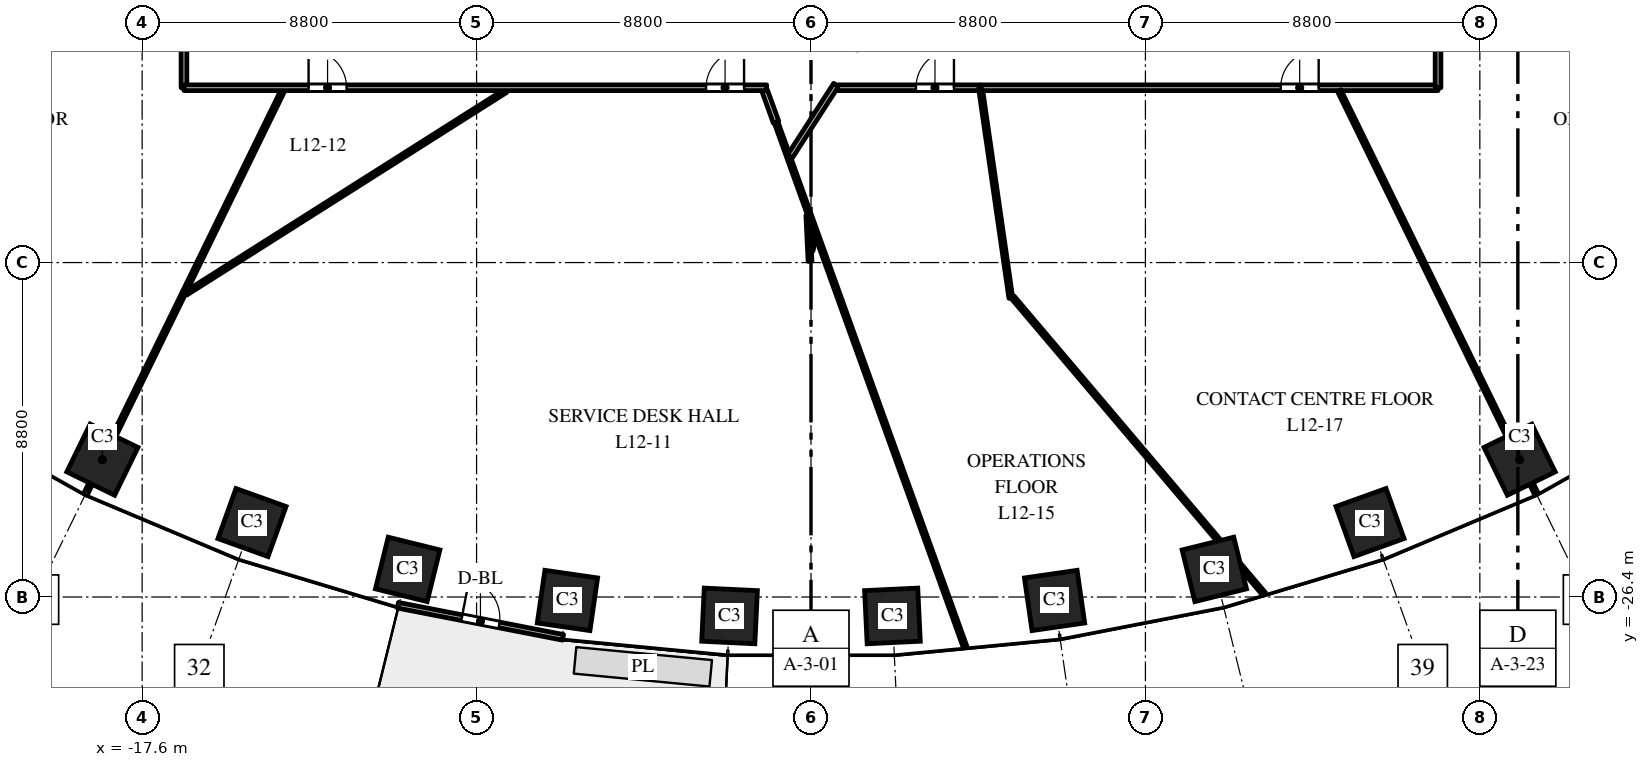
"""IFC4 building model, lengths in metres.
Left out: names, types, materials, properties, quantities, classifications, styles, units other than length and angle.
Written with IfcOpenShell. Run it as: python <this file> out.ifc"""

import sys

from ifc_helpers import new_model, si_unit, direction, frame, frame_2d, origin, origin_2d, place, context, subcontext, project, spatial, rectangle, extrude, element, fill, save


model = new_model("IFC4")
c1 = context("Model", 3, precision=1e-05, world=origin(), true_north=direction((0.0, 1.0)))
c2 = subcontext(c1, "Body", "Model", "MODEL_VIEW")
j1 = project(units=[si_unit("LENGTHUNIT", "METRE"), si_unit("PLANEANGLEUNIT", "RADIAN")], contexts=[c1])
p1 = place(None, origin())
s1 = spatial("IfcSite", under=j1, at=p1, CompositionType="ELEMENT")
p2 = place(p1, origin())
s2 = spatial("IfcBuilding", under=s1, at=p2, CompositionType="ELEMENT")
p3 = place(p2, frame((0.0, 0.0, 58.5)))
s3 = spatial("IfcBuildingStorey", under=s2, at=p3, CompositionType="ELEMENT", Elevation=58.5)
for number, where, z_axis, x_axis in (
    (1, (-18.646, -22.785, 0.0), (0.0, 0.0, 1.0), (0.898, -0.439, 0.0)),
    (2, (-14.709, -24.441, 0.0), (0.0, 0.0, 1.0), (0.941, -0.338, 0.0)),
    (3, (-10.613, -25.674, 0.0), (0.0, 0.0, 1.0), (0.971, -0.24, 0.0)),
    (4, (-6.409, -26.491, 0.0), (0.0, 0.0, 1.0), (0.99, -0.143, 0.0)),
    (5, (-2.143, -26.898, 0.0), (0.0, 0.0, 1.0), (0.999, -0.048, 0.0)),
    (6, (2.143, -26.898, 0.0), (0.0, 0.0, 1.0), (0.999, 0.048, 0.0)),
    (7, (6.409, -26.491, 0.0), (0.0, 0.0, 1.0), (0.99, 0.143, 0.0)),
    (8, (10.613, -25.674, 0.0), (0.0, 0.0, 1.0), (0.971, 0.24, 0.0)),
    (9, (14.709, -24.441, 0.0), (0.0, 0.0, 1.0), (0.941, 0.338, 0.0)),
    (10, (18.646, -22.785, 0.0), (0.0, 0.0, 1.0), (0.898, 0.439, 0.0)),
):
    element("IfcColumn", number, at=place(p3, frame(where, z_axis=z_axis, x_axis=x_axis)), inside=s3, PredefinedType="COLUMN", context=c2, shape_type="SweptSolid", body=[
        extrude(rectangle(XDim=1.4, YDim=1.4, at=origin_2d()), origin(), (0.0, 0.0, 1.0), 4.0),
    ])
p4 = place(p3, frame((-10.871, -26.617, 0.0), z_axis=(0.0, 0.0, 1.0), x_axis=(0.981631174778, -0.190788460615, 0.0)))
e11 = element("IfcWall", 11, at=p4, inside=s3, PredefinedType="STANDARD", context=c2, shape_type="SweptSolid", body=[
    extrude(rectangle(XDim=4.426, YDim=0.15, at=frame_2d((2.213, 0.0))), origin(), (0.0, 0.0, 1.0), 3.7),
])
p5 = place(p4, frame((1.713, 0.0, 0.0)))
e12 = element("IfcOpeningElement", 12, at=p5, cuts=e11, PredefinedType="OPENING", context=c2, shape_type="SweptSolid", body=[
    extrude(rectangle(XDim=1.0, YDim=2.4, at=frame_2d((0.5, 1.2))), frame((0.0, 0.085, 0.0), z_axis=(0.0, -1.0, 0.0), x_axis=(1.0, 0.0, 0.0)), (0.0, 0.0, 1.0), 0.17),
])
p6 = place(p3, frame((-19.086, -23.685, 0.0), z_axis=(0.0, 0.0, 1.0), x_axis=(0.439199750603, 0.898389436197, 0.0)))
e13 = element("IfcWall", 13, at=p6, inside=s3, PredefinedType="PARTITIONING", context=c2, shape_type="SweptSolid", body=[
    extrude(rectangle(XDim=11.81, YDim=0.1, at=frame_2d((5.905, 0.0))), origin(), (0.0, 0.0, 1.0), 3.7),
])
p7 = place(p3, frame((-16.452, -18.412, 0.0), z_axis=(0.0, 0.0, 1.0), x_axis=(0.84481391066, 0.535060236194, 0.0)))
e14 = element("IfcWall", 14, at=p7, inside=s3, PredefinedType="PARTITIONING", context=c2, shape_type="SweptSolid", body=[
    extrude(rectangle(XDim=9.971, YDim=0.1, at=frame_2d((4.986, 0.0))), origin(), (0.0, 0.0, 1.0), 2.85),
])
p8 = place(p3, frame((-16.5, -13.0, 0.0), z_axis=(0.0, 0.0, 1.0), x_axis=(0.0, 1.0, 0.0)))
e15 = element("IfcWall", 15, at=p8, inside=s3, PredefinedType="PARTITIONING", context=c2, shape_type="SweptSolid", body=[
    extrude(rectangle(XDim=2.3, YDim=0.15, at=frame_2d((1.15, 0.0))), origin(), (0.0, 0.0, 1.0), 2.75),
])
p9 = place(p3, frame((-16.5, -13.0, 0.0), z_axis=(0.0, 0.0, 1.0), x_axis=(1.0, 0.0, 0.0)))
e16 = element("IfcWall", 16, at=p9, inside=s3, PredefinedType="PARTITIONING", context=c2, shape_type="SweptSolid", body=[
    extrude(rectangle(XDim=15.334, YDim=0.15, at=frame_2d((7.667, 0.0))), origin(), (0.0, 0.0, 1.0), 2.85),
])
p10 = place(p9, frame((13.739, 0.0, 0.0)))
e17 = element("IfcOpeningElement", 17, at=p10, cuts=e16, PredefinedType="OPENING", context=c2, shape_type="SweptSolid", body=[
    extrude(rectangle(XDim=1.0, YDim=2.1, at=frame_2d((0.5, 1.05))), frame((0.0, 0.085, 0.0), z_axis=(0.0, -1.0, 0.0), x_axis=(1.0, 0.0, 0.0)), (0.0, 0.0, 1.0), 0.17),
])
p11 = place(p9, frame((3.279, 0.0, 0.0)))
e18 = element("IfcOpeningElement", 18, at=p11, cuts=e16, PredefinedType="OPENING", context=c2, shape_type="SweptSolid", body=[
    extrude(rectangle(XDim=1.0, YDim=2.1, at=frame_2d((0.5, 1.05))), frame((0.0, 0.085, 0.0), z_axis=(0.0, -1.0, 0.0), x_axis=(1.0, 0.0, 0.0)), (0.0, 0.0, 1.0), 0.17),
])
p12 = place(p3, frame((-1.218, -13.079, 0.0), z_axis=(0.0, 0.0, 1.0), x_axis=(0.339052677967, -0.940767389722, 0.0)))
e19 = element("IfcWall", 19, at=p12, inside=s3, PredefinedType="PARTITIONING", context=c2, shape_type="SweptSolid", body=[
    extrude(rectangle(XDim=0.882, YDim=0.15, at=frame_2d((0.441, 0.0))), origin(), (0.0, 0.0, 1.0), 2.85),
])
p13 = place(p3, frame((-0.916, -13.918, 0.0), z_axis=(0.0, 0.0, 1.0), x_axis=(0.338981210053, -0.940793143699, 0.0)))
e20 = element("IfcWall", 20, at=p13, inside=s3, PredefinedType="PARTITIONING", context=c2, shape_type="SweptSolid", body=[
    extrude(rectangle(XDim=14.664, YDim=0.1, at=frame_2d((7.332, 0.0))), origin(), (0.0, 0.0, 1.0), 2.85),
])
p14 = place(p3, frame((-0.084, -16.356, 0.0), z_axis=(0.0, 0.0, 1.0), x_axis=(0.047967320325, -0.998848905581, 0.0)))
e21 = element("IfcWall", 21, at=p14, inside=s3, PredefinedType="PARTITIONING", context=c2, shape_type="SweptSolid", body=[
    extrude(rectangle(XDim=1.211, YDim=0.1, at=frame_2d((0.606, 0.0))), origin(), (0.0, 0.0, 1.0), 3.7),
])
p15 = place(p3, frame((-0.554, -14.806, 0.0), z_axis=(0.0, 0.0, 1.0), x_axis=(0.542256038928, 0.840213299256, 0.0)))
e22 = element("IfcWall", 22, at=p15, inside=s3, PredefinedType="PARTITIONING", context=c2, shape_type="SweptSolid", body=[
    extrude(rectangle(XDim=2.239, YDim=0.15, at=frame_2d((1.119, 0.0))), origin(), (0.0, 0.0, 1.0), 3.7),
])
p16 = place(p3, frame((0.002, -17.284, 0.0), z_axis=(0.0, 0.0, 1.0), x_axis=(0.240121592304, 0.970742819139, 0.0)))
e23 = element("IfcWall", 23, at=p16, inside=s3, PredefinedType="PARTITIONING", context=c2, shape_type="SweptSolid", body=[
    extrude(rectangle(XDim=0.405, YDim=0.1, at=frame_2d((0.202, 0.0))), origin(), (0.0, 0.0, 1.0), 3.7),
])
p17 = place(p3, frame((0.701, -13.0, 0.0), z_axis=(0.0, 0.0, 1.0), x_axis=(1.0, 0.0, 0.0)))
e24 = element("IfcWall", 24, at=p17, inside=s3, PredefinedType="PARTITIONING", context=c2, shape_type="SweptSolid", body=[
    extrude(rectangle(XDim=3.758, YDim=0.15, at=frame_2d((1.879, 0.0))), origin(), (0.0, 0.0, 1.0), 2.85),
])
p18 = place(p17, frame((2.061, 0.0, 0.0)))
e25 = element("IfcOpeningElement", 25, at=p18, cuts=e24, PredefinedType="OPENING", context=c2, shape_type="SweptSolid", body=[
    extrude(rectangle(XDim=1.0, YDim=2.1, at=frame_2d((0.5, 1.05))), frame((0.0, 0.085, 0.0), z_axis=(0.0, -1.0, 0.0), x_axis=(1.0, 0.0, 0.0)), (0.0, 0.0, 1.0), 0.17),
])
p19 = place(p3, frame((4.459, -13.004, 0.0), z_axis=(0.0, 0.0, 1.0), x_axis=(0.143036391033, -0.989717429795, 0.0)))
e26 = element("IfcWall", 26, at=p19, inside=s3, PredefinedType="PARTITIONING", context=c2, shape_type="SweptSolid", body=[
    extrude(rectangle(XDim=5.586, YDim=0.1, at=frame_2d((2.793, 0.0))), origin(), (0.0, 0.0, 1.0), 3.7),
])
p20 = place(p3, frame((4.479, -13.0, 0.0), z_axis=(0.0, 0.0, 1.0), x_axis=(1.0, 0.0, 0.0)))
e27 = element("IfcWall", 27, at=p20, inside=s3, PredefinedType="PARTITIONING", context=c2, shape_type="SweptSolid", body=[
    extrude(rectangle(XDim=12.021, YDim=0.15, at=frame_2d((6.01, 0.0))), origin(), (0.0, 0.0, 1.0), 2.85),
])
p21 = place(p20, frame((7.88, 0.0, 0.0)))
e28 = element("IfcOpeningElement", 28, at=p21, cuts=e27, PredefinedType="OPENING", context=c2, shape_type="SweptSolid", body=[
    extrude(rectangle(XDim=1.0, YDim=2.1, at=frame_2d((0.5, 1.05))), frame((0.0, 0.085, 0.0), z_axis=(0.0, -1.0, 0.0), x_axis=(1.0, 0.0, 0.0)), (0.0, 0.0, 1.0), 0.17),
])
p22 = place(p3, frame((5.306, -18.512, 0.0), z_axis=(0.0, 0.0, 1.0), x_axis=(0.646500054355, -0.762913939917, 0.0)))
e29 = element("IfcWall", 29, at=p22, inside=s3, PredefinedType="PARTITIONING", context=c2, shape_type="SweptSolid", body=[
    extrude(rectangle(XDim=10.239, YDim=0.1, at=frame_2d((5.119, 0.0))), origin(), (0.0, 0.0, 1.0), 2.85),
])
p23 = place(p3, frame((13.899, -13.075, 0.0), z_axis=(0.0, 0.0, 1.0), x_axis=(0.439199750603, -0.898389436197, 0.0)))
e30 = element("IfcWall", 30, at=p23, inside=s3, PredefinedType="PARTITIONING", context=c2, shape_type="SweptSolid", body=[
    extrude(rectangle(XDim=11.81, YDim=0.1, at=frame_2d((5.905, 0.0))), origin(), (0.0, 0.0, 1.0), 2.85),
])
p24 = place(p3, frame((16.5, -13.0, 0.0), z_axis=(0.0, 0.0, 1.0), x_axis=(0.0, 1.0, 0.0)))
e31 = element("IfcWall", 31, at=p24, inside=s3, PredefinedType="PARTITIONING", context=c2, shape_type="SweptSolid", body=[
    extrude(rectangle(XDim=2.3, YDim=0.15, at=frame_2d((1.15, 0.0))), origin(), (0.0, 0.0, 1.0), 3.7),
])
p25 = place(p5, origin())
e32 = element("IfcDoor", 32, at=p25, inside=s3, OperationType="SINGLE_SWING_LEFT", PredefinedType="DOOR", context=c2, shape_type="SweptSolid", body=[
    extrude(rectangle(XDim=1.0, YDim=2.4, at=frame_2d((0.5, 1.2))), frame((0.0, 0.025, 0.0), z_axis=(0.0, -1.0, 0.0), x_axis=(1.0, 0.0, 0.0)), (0.0, 0.0, 1.0), 0.05),
])
fill(e12, e32)
p26 = place(p10, origin())
e33 = element("IfcDoor", 33, at=p26, inside=s3, OperationType="SINGLE_SWING_RIGHT", PredefinedType="DOOR", context=c2, shape_type="SweptSolid", body=[
    extrude(rectangle(XDim=1.0, YDim=2.1, at=frame_2d((0.5, 1.05))), frame((0.0, 0.025, 0.0), z_axis=(0.0, -1.0, 0.0), x_axis=(1.0, 0.0, 0.0)), (0.0, 0.0, 1.0), 0.05),
])
fill(e17, e33)
p27 = place(p11, origin())
e34 = element("IfcDoor", 34, at=p27, inside=s3, OperationType="SINGLE_SWING_LEFT", PredefinedType="DOOR", context=c2, shape_type="SweptSolid", body=[
    extrude(rectangle(XDim=1.0, YDim=2.1, at=frame_2d((0.5, 1.05))), frame((0.0, 0.025, 0.0), z_axis=(0.0, -1.0, 0.0), x_axis=(1.0, 0.0, 0.0)), (0.0, 0.0, 1.0), 0.05),
])
fill(e18, e34)
p28 = place(p18, origin())
e35 = element("IfcDoor", 35, at=p28, inside=s3, OperationType="SINGLE_SWING_RIGHT", PredefinedType="DOOR", context=c2, shape_type="SweptSolid", body=[
    extrude(rectangle(XDim=1.0, YDim=2.1, at=frame_2d((0.5, 1.05))), frame((0.0, 0.025, 0.0), z_axis=(0.0, -1.0, 0.0), x_axis=(1.0, 0.0, 0.0)), (0.0, 0.0, 1.0), 0.05),
])
fill(e25, e35)
p29 = place(p21, origin())
e36 = element("IfcDoor", 36, at=p29, inside=s3, OperationType="SINGLE_SWING_RIGHT", PredefinedType="DOOR", context=c2, shape_type="SweptSolid", body=[
    extrude(rectangle(XDim=1.0, YDim=2.1, at=frame_2d((0.5, 1.05))), frame((0.0, 0.025, 0.0), z_axis=(0.0, -1.0, 0.0), x_axis=(1.0, 0.0, 0.0)), (0.0, 0.0, 1.0), 0.05),
])
fill(e28, e36)
save(model, sys.argv[1])
